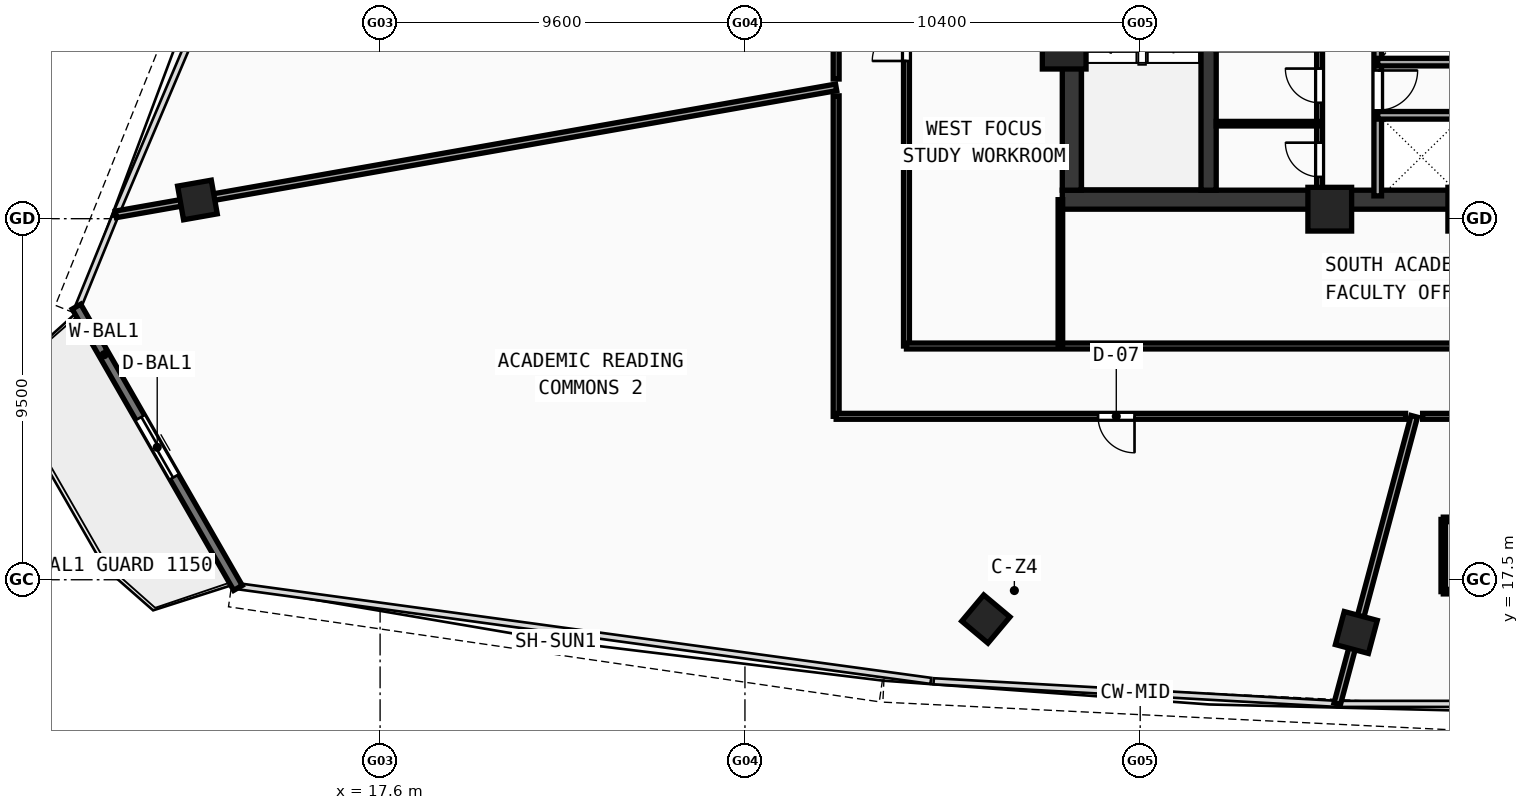
"""IFC4 building model, lengths in metres.
Left out: names, types, materials, properties, quantities, classifications, styles, units other than length and angle.
Written with IfcOpenShell. Run it as: python <this file> out.ifc"""

import sys

from ifc_helpers import new_model, si_unit, direction, frame, frame_2d, origin, origin_with_axes, origin_2d, place, context, subcontext, project, spatial, rectangle, hollow_rectangle, extrude, source, transform, mapped, element, fill, save


model = new_model("IFC4")
c1 = context("Model", 3, precision=1e-05, world=origin(), true_north=direction((0.0, 1.0)))
c2 = subcontext(c1, "Body", "Model", "MODEL_VIEW")
j1 = project(units=[si_unit("LENGTHUNIT", "METRE"), si_unit("PLANEANGLEUNIT", "RADIAN")], contexts=[c1])
p1 = place(None, origin())
s1 = spatial("IfcSite", under=j1, at=p1, CompositionType="ELEMENT")
p2 = place(p1, origin())
s2 = spatial("IfcBuilding", under=s1, at=p2, CompositionType="ELEMENT")
p3 = place(p2, frame((0.0, 0.0, 196.16)))
s3 = spatial("IfcBuildingStorey", under=s2, at=p3, CompositionType="ELEMENT", Elevation=196.16)
p4 = place(p3, frame((35.55, 27.5, 0.0), z_axis=(0.0, 0.0, 1.0), x_axis=(1.0, 0.0, 0.0)))
e1 = element("IfcWall", 1, at=p4, inside=s3, PredefinedType="SHEAR", context=c2, shape_type="SweptSolid", body=[
    extrude(rectangle(XDim=24.9, YDim=0.5, at=frame_2d((12.45, 0.0))), origin(), (0.0, 0.0, 1.0), 3.54),
])
p5 = place(p3, frame((35.8, 27.75, 0.0), z_axis=(0.0, 0.0, 1.0), x_axis=(0.0, 1.0, 0.0)))
e2 = element("IfcWall", 2, at=p5, inside=s3, PredefinedType="SHEAR", context=c2, shape_type="SweptSolid", body=[
    extrude(rectangle(XDim=12.2, YDim=0.5, at=frame_2d((6.1, 0.0))), origin(), (0.0, 0.0, 1.0), 3.54),
])
p6 = place(p3, frame((39.4, 27.75, 0.0), z_axis=(0.0, 0.0, 1.0), x_axis=(0.0, 1.0, 0.0)))
e3 = element("IfcWall", 3, at=p6, inside=s3, PredefinedType="SHEAR", context=c2, shape_type="SweptSolid", body=[
    extrude(rectangle(XDim=12.2, YDim=0.4, at=frame_2d((6.1, 0.0))), origin(), (0.0, 0.0, 1.0), 3.54),
])
p7 = place(p6, frame((10.0, 0.0, 0.0)))
e4 = element("IfcOpeningElement", 4, at=p7, cuts=e3, PredefinedType="OPENING", context=c2, shape_type="SweptSolid", body=[
    extrude(rectangle(XDim=1.1, YDim=2.1, at=frame_2d((0.55, 1.05))), frame((0.0, 0.21, 0.0), z_axis=(0.0, -1.0, 0.0), x_axis=(1.0, 0.0, 0.0)), (0.0, 0.0, 1.0), 0.42),
])
m1 = source(origin(), c2, "Body", "SweptSolid", [
    extrude(hollow_rectangle(XDim=1.15, YDim=1.15, WallThickness=0.048, at=origin_2d()), origin(), (0.0, 0.0, 1.0), 3.8),
])
for number, where, z_axis, x_axis in (
    (5, (42.588, 27.25, -0.26), (0.0, 0.0, 1.0), (1.0, 0.0, 0.0)),
    (6, (46.272, 27.25, -0.26), (0.0, 0.0, 1.0), (1.0, 0.0, 0.0)),
    (7, (35.6, 31.513, -0.26), (0.0, 0.0, 1.0), (1.0, 0.0, 0.0)),
):
    element("IfcColumn", number, at=place(p3, frame(where, z_axis=z_axis, x_axis=x_axis)), inside=s3, PredefinedType="COLUMN", context=c2, shape_type="MappedRepresentation", body=[
        mapped(m1, transform((0.0, 0.0, 0.0), scale=1.0)),
    ])
m2 = source(origin(), c2, "Body", "SweptSolid", [
    extrude(hollow_rectangle(XDim=0.9, YDim=0.9, WallThickness=0.036, at=origin_2d()), origin(), (0.0, 0.0, 1.0), 3.8),
])
for number, where, z_axis, x_axis in (
    (8, (33.539, 16.466, -0.26), (0.0, 0.0, 1.0), (0.766, -0.643, 0.0)),
    (9, (43.288, 16.112, -0.26), (0.0, 0.0, 1.0), (0.966, -0.259, 0.0)),
    (10, (12.793, 27.492, -0.26), (0.0, 0.0, 1.0), (0.174, -0.985, 0.0)),
):
    element("IfcColumn", number, at=place(p3, frame(where, z_axis=z_axis, x_axis=x_axis)), inside=s3, PredefinedType="COLUMN", context=c2, shape_type="MappedRepresentation", body=[
        mapped(m2, transform((0.0, 0.0, 0.0), scale=1.0)),
    ])
p8 = place(p3, frame((9.611, 24.686, 0.0), z_axis=(0.0, 0.0, 1.0), x_axis=(0.497930869929, -0.867216725376, 0.0)))
e11 = element("IfcWall", 11, at=p8, inside=s3, PredefinedType="STANDARD", context=c2, shape_type="SweptSolid", body=[
    extrude(rectangle(XDim=8.534, YDim=0.26, at=frame_2d((4.267, 0.0))), origin(), (0.0, 0.0, 1.0), 3.54),
])
p9 = place(p8, frame((3.367, 0.0, 0.0)))
e12 = element("IfcOpeningElement", 12, at=p9, cuts=e11, PredefinedType="OPENING", context=c2, shape_type="SweptSolid", body=[
    extrude(rectangle(XDim=1.8, YDim=2.15, at=frame_2d((0.9, 1.075))), frame((0.0, 0.14, 0.0), z_axis=(0.0, -1.0, 0.0), x_axis=(1.0, 0.0, 0.0)), (0.0, 0.0, 1.0), 0.28),
])
p10 = place(p3, frame((43.85, 27.6, 0.0), z_axis=(0.0, 0.0, 1.0), x_axis=(0.0, 1.0, 0.0)))
e13 = element("IfcWall", 13, at=p10, inside=s3, PredefinedType="SOLIDWALL", context=c2, shape_type="SweptSolid", body=[
    extrude(rectangle(XDim=6.22, YDim=0.2, at=frame_2d((3.11, 0.0))), origin(), (0.0, 0.0, 1.0), 3.54),
])
p11 = place(p10, frame((2.25, 0.0, 0.0)))
e14 = element("IfcOpeningElement", 14, at=p11, cuts=e13, PredefinedType="OPENING", context=c2, shape_type="SweptSolid", body=[
    extrude(rectangle(XDim=1.05, YDim=2.1, at=frame_2d((0.525, 1.05))), frame((0.0, 0.11, 0.0), z_axis=(0.0, -1.0, 0.0), x_axis=(1.0, 0.0, 0.0)), (0.0, 0.0, 1.0), 0.22),
])
p12 = place(p3, frame((43.85, 29.72, 0.0), z_axis=(0.0, 0.0, 1.0), x_axis=(1.0, 0.0, 0.0)))
e15 = element("IfcWall", 15, at=p12, inside=s3, PredefinedType="SOLIDWALL", context=c2, shape_type="SweptSolid", body=[
    extrude(rectangle(XDim=7.2, YDim=0.2, at=frame_2d((3.6, 0.0))), origin(), (0.0, 0.0, 1.0), 3.54),
])
p13 = place(p3, frame((43.85, 31.12, 0.0), z_axis=(0.0, 0.0, 1.0), x_axis=(1.0, 0.0, 0.0)))
e16 = element("IfcWall", 16, at=p13, inside=s3, PredefinedType="SOLIDWALL", context=c2, shape_type="SweptSolid", body=[
    extrude(rectangle(XDim=9.83, YDim=0.2, at=frame_2d((4.915, 0.0))), origin(), (0.0, 0.0, 1.0), 3.54),
])
p14 = place(p3, frame((42.32, 27.6, 0.0), z_axis=(0.0, 0.0, 1.0), x_axis=(0.0, 1.0, 0.0)))
e17 = element("IfcWall", 17, at=p14, inside=s3, PredefinedType="PARTITIONING", context=c2, shape_type="SweptSolid", body=[
    extrude(rectangle(XDim=5.9, YDim=0.155, at=frame_2d((2.95, 0.0))), origin(), (0.0, 0.0, 1.0), 3.54),
])
p15 = place(p14, frame((0.5, 0.0, 0.0)))
e18 = element("IfcOpeningElement", 18, at=p15, cuts=e17, PredefinedType="OPENING", context=c2, shape_type="SweptSolid", body=[
    extrude(rectangle(XDim=0.9, YDim=2.1, at=frame_2d((0.45, 1.05))), frame((0.0, 0.087, 0.0), z_axis=(0.0, -1.0, 0.0), x_axis=(1.0, 0.0, 0.0)), (0.0, 0.0, 1.0), 0.175),
])
p16 = place(p14, frame((2.45, 0.0, 0.0)))
e19 = element("IfcOpeningElement", 19, at=p16, cuts=e17, PredefinedType="OPENING", context=c2, shape_type="SweptSolid", body=[
    extrude(rectangle(XDim=0.9, YDim=2.1, at=frame_2d((0.45, 1.05))), frame((0.0, 0.087, 0.0), z_axis=(0.0, -1.0, 0.0), x_axis=(1.0, 0.0, 0.0)), (0.0, 0.0, 1.0), 0.175),
])
p17 = place(p14, frame((4.42, 0.0, 0.0)))
e20 = element("IfcOpeningElement", 20, at=p17, cuts=e17, PredefinedType="OPENING", context=c2, shape_type="SweptSolid", body=[
    extrude(rectangle(XDim=0.94, YDim=2.1, at=frame_2d((0.47, 1.05))), frame((0.0, 0.087, 0.0), z_axis=(0.0, -1.0, 0.0), x_axis=(1.0, 0.0, 0.0)), (0.0, 0.0, 1.0), 0.175),
])
p18 = place(p3, frame((39.6, 29.5, 0.0), z_axis=(0.0, 0.0, 1.0), x_axis=(1.0, 0.0, 0.0)))
e21 = element("IfcWall", 21, at=p18, inside=s3, PredefinedType="PARTITIONING", context=c2, shape_type="SweptSolid", body=[
    extrude(rectangle(XDim=2.72, YDim=0.12, at=frame_2d((1.36, 0.0))), origin(), (0.0, 0.0, 1.0), 3.54),
])
p19 = place(p3, frame((31.45, 23.65, 0.0), z_axis=(0.0, 0.0, 1.0), x_axis=(0.0, 1.0, 0.0)))
e22 = element("IfcWall", 22, at=p19, inside=s3, PredefinedType="PARTITIONING", context=c2, shape_type="SweptSolid", body=[
    extrude(rectangle(XDim=16.6, YDim=0.155, at=frame_2d((8.3, 0.0))), origin(), (0.0, 0.0, 1.0), 2.89),
])
p20 = place(p19, frame((7.5, 0.0, 0.0)))
e23 = element("IfcOpeningElement", 23, at=p20, cuts=e22, PredefinedType="OPENING", context=c2, shape_type="SweptSolid", body=[
    extrude(rectangle(XDim=0.9, YDim=2.08, at=frame_2d((0.45, 1.04))), frame((0.0, 0.087, 0.0), z_axis=(0.0, -1.0, 0.0), x_axis=(1.0, 0.0, 0.0)), (0.0, 0.0, 1.0), 0.175),
])
p21 = place(p3, frame((31.45, 23.65, 0.0), z_axis=(0.0, 0.0, 1.0), x_axis=(1.0, 0.0, 0.0)))
e24 = element("IfcWall", 24, at=p21, inside=s3, PredefinedType="PARTITIONING", context=c2, shape_type="SweptSolid", body=[
    extrude(rectangle(XDim=33.1, YDim=0.155, at=frame_2d((16.55, 0.0))), origin(), (0.0, 0.0, 1.0), 2.89),
])
p22 = place(p21, frame((16.0, 0.0, 0.0)))
e25 = element("IfcOpeningElement", 25, at=p22, cuts=e24, PredefinedType="OPENING", context=c2, shape_type="SweptSolid", body=[
    extrude(rectangle(XDim=0.92, YDim=2.1, at=frame_2d((0.46, 1.05))), frame((0.0, 0.087, 0.0), z_axis=(0.0, -1.0, 0.0), x_axis=(1.0, 0.0, 0.0)), (0.0, 0.0, 1.0), 0.175),
])
p23 = place(p3, frame((35.5, 23.65, 0.0), z_axis=(0.0, 0.0, 1.0), x_axis=(0.0, 1.0, 0.0)))
e26 = element("IfcWall", 26, at=p23, inside=s3, PredefinedType="PARTITIONING", context=c2, shape_type="SweptSolid", body=[
    extrude(rectangle(XDim=3.85, YDim=0.12, at=frame_2d((1.925, 0.0))), origin(), (0.0, 0.0, 1.0), 3.14),
])
p24 = place(p3, frame((29.6, 30.456, 0.0), z_axis=(0.0, 0.0, 1.0), x_axis=(-0.984807685374, -0.173648561263, 0.0)))
e27 = element("IfcWall", 27, at=p24, inside=s3, PredefinedType="PARTITIONING", context=c2, shape_type="SweptSolid", body=[
    extrude(rectangle(XDim=19.246, YDim=0.175, at=frame_2d((9.623, 0.0))), origin(), (0.0, 0.0, 1.0), 2.89),
])
p25 = place(p3, frame((44.811, 21.8, 0.0), z_axis=(0.0, 0.0, 1.0), x_axis=(-0.258810863021, -0.965928018634, 0.0)))
e28 = element("IfcWall", 28, at=p25, inside=s3, PredefinedType="PARTITIONING", context=c2, shape_type="SweptSolid", body=[
    extrude(rectangle(XDim=7.833, YDim=0.175, at=frame_2d((3.917, 0.0))), origin(), (0.0, 0.0, 1.0), 2.89),
])
p26 = place(p3, frame((29.6, 21.8, 0.0), z_axis=(0.0, 0.0, 1.0), x_axis=(0.0, 1.0, 0.0)))
e29 = element("IfcWall", 29, at=p26, inside=s3, PredefinedType="PARTITIONING", context=c2, shape_type="SweptSolid", body=[
    extrude(rectangle(XDim=8.432, YDim=0.155, at=frame_2d((4.216, 0.0))), origin(), (0.0, 0.0, 1.0), 3.14),
])
p27 = place(p3, frame((29.6, 30.675, 0.0), z_axis=(0.0, 0.0, 1.0), x_axis=(0.0, 1.0, 0.0)))
e30 = element("IfcWall", 30, at=p27, inside=s3, PredefinedType="PARTITIONING", context=c2, shape_type="SweptSolid", body=[
    extrude(rectangle(XDim=8.783, YDim=0.155, at=frame_2d((4.392, 0.0))), origin(), (0.0, 0.0, 1.0), 3.14),
])
p28 = place(p27, frame((3.932, 0.0, 0.0)))
e31 = element("IfcOpeningElement", 31, at=p28, cuts=e30, PredefinedType="OPENING", context=c2, shape_type="SweptSolid", body=[
    extrude(rectangle(XDim=0.92, YDim=2.1, at=frame_2d((0.46, 1.05))), frame((0.0, 0.087, 0.0), z_axis=(0.0, -1.0, 0.0), x_axis=(1.0, 0.0, 0.0)), (0.0, 0.0, 1.0), 0.175),
])
p29 = place(p3, frame((50.969, 21.8, 0.0), z_axis=(0.0, 0.0, 1.0), x_axis=(-1.0, 0.0, 0.0)))
e32 = element("IfcWall", 32, at=p29, inside=s3, PredefinedType="PARTITIONING", context=c2, shape_type="SweptSolid", body=[
    extrude(rectangle(XDim=5.938, YDim=0.155, at=frame_2d((2.969, 0.0))), origin(), (0.0, 0.0, 1.0), 3.54),
])
p30 = place(p29, frame((2.494, 0.0, 0.0)))
e33 = element("IfcOpeningElement", 33, at=p30, cuts=e32, PredefinedType="OPENING", context=c2, shape_type="SweptSolid", body=[
    extrude(rectangle(XDim=0.96, YDim=2.12, at=frame_2d((0.48, 1.06))), frame((0.0, 0.087, 0.0), z_axis=(0.0, -1.0, 0.0), x_axis=(1.0, 0.0, 0.0)), (0.0, 0.0, 1.0), 0.175),
])
p31 = place(p3, frame((44.583, 21.8, 0.0), z_axis=(0.0, 0.0, 1.0), x_axis=(-1.0, 0.0, 0.0)))
e34 = element("IfcWall", 34, at=p31, inside=s3, PredefinedType="PARTITIONING", context=c2, shape_type="SweptSolid", body=[
    extrude(rectangle(XDim=14.983, YDim=0.155, at=frame_2d((7.492, 0.0))), origin(), (0.0, 0.0, 1.0), 2.89),
])
p32 = place(p31, frame((7.133, 0.0, 0.0)))
e35 = element("IfcOpeningElement", 35, at=p32, cuts=e34, PredefinedType="OPENING", context=c2, shape_type="SweptSolid", body=[
    extrude(rectangle(XDim=0.96, YDim=2.12, at=frame_2d((0.48, 1.06))), frame((0.0, 0.087, 0.0), z_axis=(0.0, -1.0, 0.0), x_axis=(1.0, 0.0, 0.0)), (0.0, 0.0, 1.0), 0.175),
])
p33 = place(p3, frame((45.575, 17.187, 0.0), z_axis=(0.0, 0.0, 1.0), x_axis=(1.0, 0.0, 0.0)))
e36 = element("IfcWall", 36, at=p33, inside=s3, PredefinedType="PARTITIONING", context=c2, shape_type="SweptSolid", body=[
    extrude(rectangle(XDim=2.05, YDim=0.12, at=frame_2d((1.025, 0.0))), origin(), (0.0, 0.0, 1.0), 3.54),
])
p34 = place(p33, frame((0.6, 0.0, 0.0)))
e37 = element("IfcOpeningElement", 37, at=p34, cuts=e36, PredefinedType="OPENING", context=c2, shape_type="SweptSolid", body=[
    extrude(rectangle(XDim=0.85, YDim=2.1, at=frame_2d((0.425, 1.05))), frame((0.0, 0.07, 0.0), z_axis=(0.0, -1.0, 0.0), x_axis=(1.0, 0.0, 0.0)), (0.0, 0.0, 1.0), 0.14),
])
p35 = place(p3, frame((47.625, 19.087, 0.0), z_axis=(0.0, 0.0, 1.0), x_axis=(-1.0, 0.0, 0.0)))
e38 = element("IfcWall", 38, at=p35, inside=s3, PredefinedType="PARTITIONING", context=c2, shape_type="SweptSolid", body=[
    extrude(rectangle(XDim=2.05, YDim=0.12, at=frame_2d((1.025, 0.0))), origin(), (0.0, 0.0, 1.0), 3.54),
])
p36 = place(p3, frame((45.575, 19.087, 0.0), z_axis=(0.0, 0.0, 1.0), x_axis=(0.0, -1.0, 0.0)))
e39 = element("IfcWall", 39, at=p36, inside=s3, PredefinedType="PARTITIONING", context=c2, shape_type="SweptSolid", body=[
    extrude(rectangle(XDim=1.9, YDim=0.12, at=frame_2d((0.95, 0.0))), origin(), (0.0, 0.0, 1.0), 3.54),
])
m3 = source(origin(), c2, "Body", "SweptSolid", [
    extrude(rectangle(XDim=1.8, YDim=2.15, at=frame_2d((0.9, 1.075))), frame((0.0, 0.025, 0.0), z_axis=(0.0, -1.0, 0.0), x_axis=(1.0, 0.0, 0.0)), (0.0, 0.0, 1.0), 0.05),
])
p37 = place(p9, origin_with_axes())
e40 = element("IfcDoor", 40, at=p37, inside=s3, OperationType="DOUBLE_DOOR_SLIDING", PredefinedType="DOOR", context=c2, shape_type="MappedRepresentation", body=[
    mapped(m3, transform((0.0, 0.0, 0.0), scale=1.0)),
])
fill(e12, e40)
m4 = source(origin(), c2, "Body", "SweptSolid", [
    extrude(rectangle(XDim=1.05, YDim=2.1, at=frame_2d((0.525, 1.05))), frame((0.0, 0.025, 0.0), z_axis=(0.0, -1.0, 0.0), x_axis=(1.0, 0.0, 0.0)), (0.0, 0.0, 1.0), 0.05),
])
p38 = place(p11, frame((1.05, 0.0, 0.0), z_axis=(0.0, 0.0, 1.0), x_axis=(-1.0, 0.0, 0.0)))
e41 = element("IfcDoor", 41, at=p38, inside=s3, OperationType="SINGLE_SWING_LEFT", PredefinedType="DOOR", context=c2, shape_type="MappedRepresentation", body=[
    mapped(m4, transform((0.0, 0.0, 0.0), scale=1.0)),
])
fill(e14, e41)
m5 = source(origin(), c2, "Body", "SweptSolid", [
    extrude(rectangle(XDim=0.9, YDim=2.1, at=frame_2d((0.45, 1.05))), frame((0.0, 0.025, 0.0), z_axis=(0.0, -1.0, 0.0), x_axis=(1.0, 0.0, 0.0)), (0.0, 0.0, 1.0), 0.05),
])
p39 = place(p15, origin_with_axes())
e42 = element("IfcDoor", 42, at=p39, inside=s3, OperationType="SINGLE_SWING_RIGHT", PredefinedType="DOOR", context=c2, shape_type="MappedRepresentation", body=[
    mapped(m5, transform((0.0, 0.0, 0.0), scale=1.0)),
])
fill(e18, e42)
p40 = place(p16, origin_with_axes())
e43 = element("IfcDoor", 43, at=p40, inside=s3, OperationType="SINGLE_SWING_RIGHT", PredefinedType="DOOR", context=c2, shape_type="MappedRepresentation", body=[
    mapped(m5, transform((0.0, 0.0, 0.0), scale=1.0)),
])
fill(e19, e43)
m6 = source(origin(), c2, "Body", "SweptSolid", [
    extrude(rectangle(XDim=0.9, YDim=2.08, at=frame_2d((0.45, 1.04))), frame((0.0, 0.025, 0.0), z_axis=(0.0, -1.0, 0.0), x_axis=(1.0, 0.0, 0.0)), (0.0, 0.0, 1.0), 0.05),
])
p41 = place(p20, origin_with_axes())
e44 = element("IfcDoor", 44, at=p41, inside=s3, OperationType="SINGLE_SWING_LEFT", PredefinedType="DOOR", context=c2, shape_type="MappedRepresentation", body=[
    mapped(m6, transform((0.0, 0.0, 0.0), scale=1.0)),
])
fill(e23, e44)
m7 = source(origin(), c2, "Body", "SweptSolid", [
    extrude(rectangle(XDim=0.96, YDim=2.12, at=frame_2d((0.48, 1.06))), frame((0.0, 0.025, 0.0), z_axis=(0.0, -1.0, 0.0), x_axis=(1.0, 0.0, 0.0)), (0.0, 0.0, 1.0), 0.05),
])
p42 = place(p32, origin_with_axes())
e45 = element("IfcDoor", 45, at=p42, inside=s3, OperationType="SINGLE_SWING_LEFT", PredefinedType="DOOR", context=c2, shape_type="MappedRepresentation", body=[
    mapped(m7, transform((0.0, 0.0, 0.0), scale=1.0)),
])
fill(e35, e45)
save(model, sys.argv[1])
